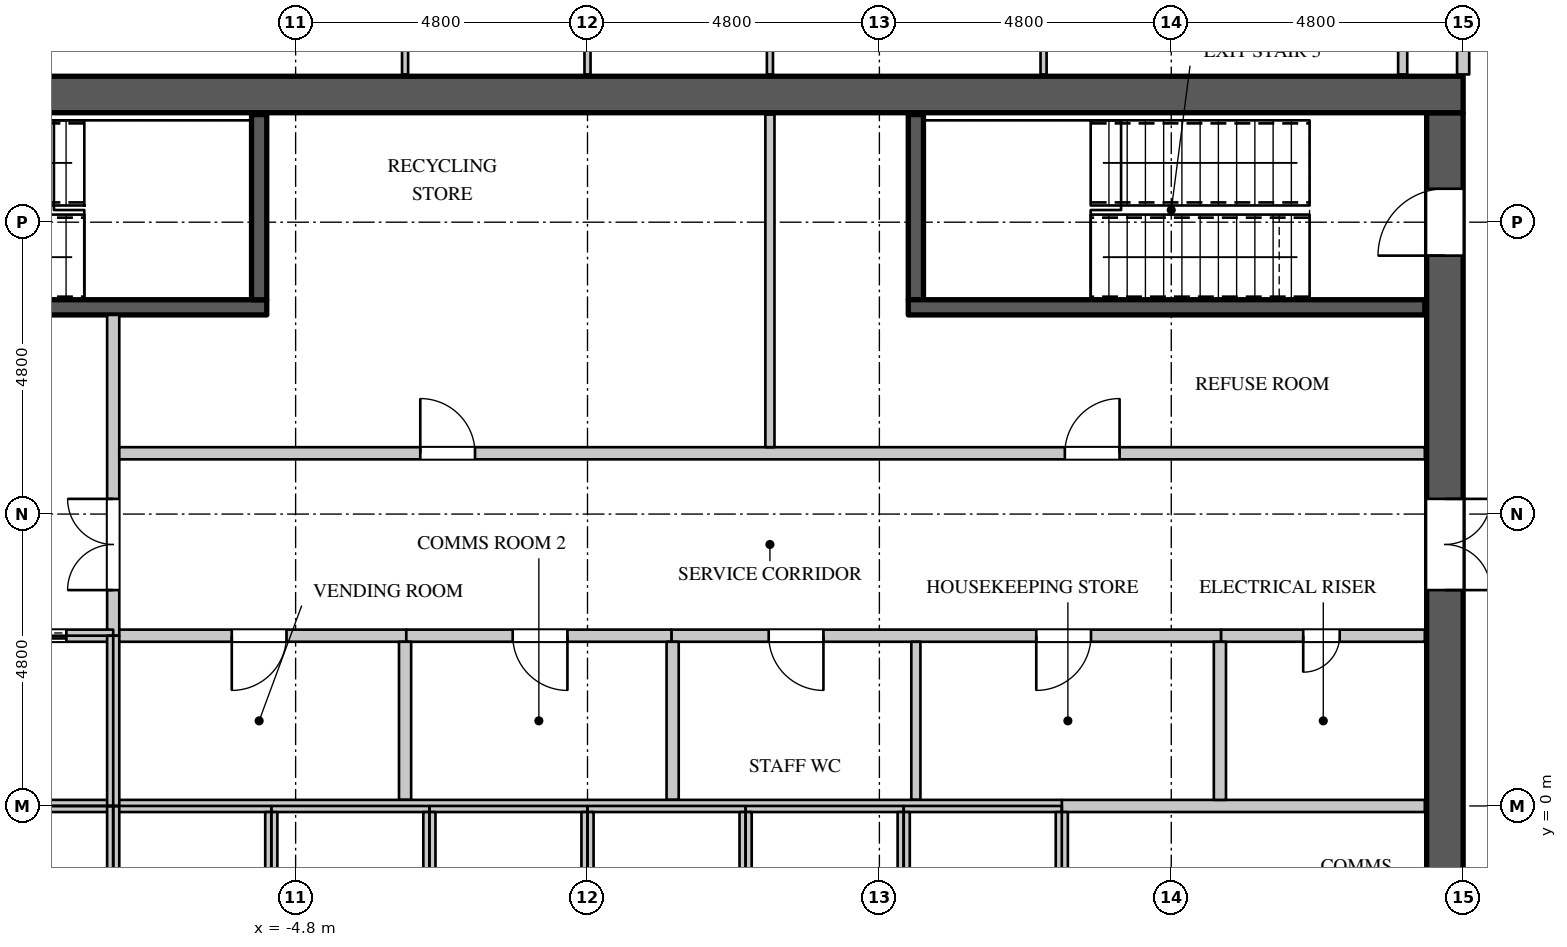
"""IFC4 building model, lengths in metres.
Left out: names, types, materials, properties, quantities, classifications, styles, units other than length and angle.
Written with IfcOpenShell. Run it as: python <this file> out.ifc"""

import sys

from ifc_helpers import new_model, si_unit, direction, frame, frame_2d, origin, place, context, subcontext, project, spatial, rectangle, extrude, element, fill, save


model = new_model("IFC4")
c1 = context("Model", 3, precision=1e-05, world=origin(), true_north=direction((0.0, 1.0)))
c2 = subcontext(c1, "Body", "Model", "MODEL_VIEW")
j1 = project(units=[si_unit("LENGTHUNIT", "METRE"), si_unit("PLANEANGLEUNIT", "RADIAN")], contexts=[c1])
p1 = place(None, origin())
s1 = spatial("IfcSite", under=j1, at=p1, CompositionType="ELEMENT")
p2 = place(p1, origin())
s2 = spatial("IfcBuilding", under=s1, at=p2, CompositionType="ELEMENT")
p3 = place(p2, frame((0.0, 0.0, 213.9)))
s3 = spatial("IfcBuildingStorey", under=s2, at=p3, CompositionType="ELEMENT", Elevation=213.9)
p4 = place(p3, frame((-14.4, 11.7, 0.0), z_axis=(0.0, 0.0, 1.0), x_axis=(1.0, 0.0, 0.0)))
e1 = element("IfcWall", 1, at=p4, inside=s3, PredefinedType="SHEAR", context=c2, shape_type="SweptSolid", body=[
    extrude(rectangle(XDim=28.8, YDim=0.6, at=frame_2d((14.4, 0.0))), origin(), (0.0, 0.0, 1.0), 4.2),
])
p5 = place(p3, frame((14.1, -11.4, 0.0), z_axis=(0.0, 0.0, 1.0), x_axis=(0.0, 1.0, 0.0)))
e2 = element("IfcWall", 2, at=p5, inside=s3, PredefinedType="SHEAR", context=c2, shape_type="SweptSolid", body=[
    extrude(rectangle(XDim=22.8, YDim=0.6, at=frame_2d((11.4, 0.0))), origin(), (0.0, 0.0, 1.0), 4.2),
])
p6 = place(p5, frame((20.45, 0.0, 0.0)))
e3 = element("IfcOpeningElement", 3, at=p6, cuts=e2, PredefinedType="OPENING", context=c2, shape_type="SweptSolid", body=[
    extrude(rectangle(XDim=1.1, YDim=2.2, at=frame_2d((0.55, 1.1))), frame((0.0, 0.31, 0.0), z_axis=(0.0, -1.0, 0.0), x_axis=(1.0, 0.0, 0.0)), (0.0, 0.0, 1.0), 0.62),
])
p7 = place(p5, frame((1.25, 0.0, 0.0)))
e4 = element("IfcOpeningElement", 4, at=p7, cuts=e2, PredefinedType="OPENING", context=c2, shape_type="SweptSolid", body=[
    extrude(rectangle(XDim=1.1, YDim=2.2, at=frame_2d((0.55, 1.1))), frame((0.0, 0.31, 0.0), z_axis=(0.0, -1.0, 0.0), x_axis=(1.0, 0.0, 0.0)), (0.0, 0.0, 1.0), 0.62),
])
p8 = place(p5, frame((14.95, 0.0, 0.0)))
e5 = element("IfcOpeningElement", 5, at=p8, cuts=e2, PredefinedType="OPENING", context=c2, shape_type="SweptSolid", body=[
    extrude(rectangle(XDim=1.5, YDim=2.4, at=frame_2d((0.75, 1.2))), frame((0.0, 0.31, 0.0), z_axis=(0.0, -1.0, 0.0), x_axis=(1.0, 0.0, 0.0)), (0.0, 0.0, 1.0), 0.62),
])
p9 = place(p5, frame((6.35, 0.0, 0.0)))
e6 = element("IfcOpeningElement", 6, at=p9, cuts=e2, PredefinedType="OPENING", context=c2, shape_type="SweptSolid", body=[
    extrude(rectangle(XDim=1.5, YDim=2.4, at=frame_2d((0.75, 1.2))), frame((0.0, 0.31, 0.0), z_axis=(0.0, -1.0, 0.0), x_axis=(1.0, 0.0, 0.0)), (0.0, 0.0, 1.0), 0.62),
])
p10 = place(p3, frame((-7.8, 2.8, 0.0), z_axis=(0.0, 0.0, 1.0), x_axis=(1.0, 0.0, 0.0)))
e7 = element("IfcWall", 7, at=p10, inside=s3, PredefinedType="PARTITIONING", context=c2, shape_type="SweptSolid", body=[
    extrude(rectangle(XDim=4.82, YDim=0.2, at=frame_2d((2.41, 0.0))), origin(), (0.0, 0.0, 1.0), 3.95),
])
p11 = place(p10, frame((1.95, 0.0, 0.0)))
e8 = element("IfcOpeningElement", 8, at=p11, cuts=e7, PredefinedType="OPENING", context=c2, shape_type="SweptSolid", body=[
    extrude(rectangle(XDim=0.9, YDim=2.2, at=frame_2d((0.45, 1.1))), frame((0.0, 0.11, 0.0), z_axis=(0.0, -1.0, 0.0), x_axis=(1.0, 0.0, 0.0)), (0.0, 0.0, 1.0), 0.22),
])
p12 = place(p3, frame((-7.8, 2.8, 0.0), z_axis=(0.0, 0.0, 1.0), x_axis=(0.0, 1.0, 0.0)))
e9 = element("IfcWall", 9, at=p12, inside=s3, PredefinedType="PARTITIONING", context=c2, shape_type="SweptSolid", body=[
    extrude(rectangle(XDim=5.275, YDim=0.2, at=frame_2d((2.637, 0.0))), origin(), (0.0, 0.0, 1.0), 3.95),
])
p13 = place(p12, frame((0.75, 0.0, 0.0)))
e10 = element("IfcOpeningElement", 10, at=p13, cuts=e9, PredefinedType="OPENING", context=c2, shape_type="SweptSolid", body=[
    extrude(rectangle(XDim=1.5, YDim=2.4, at=frame_2d((0.75, 1.2))), frame((0.0, 0.11, 0.0), z_axis=(0.0, -1.0, 0.0), x_axis=(1.0, 0.0, 0.0)), (0.0, 0.0, 1.0), 0.22),
])
p14 = place(p3, frame((-7.7, 5.8, 0.0), z_axis=(0.0, 0.0, 1.0), x_axis=(1.0, 0.0, 0.0)))
e11 = element("IfcWall", 11, at=p14, inside=s3, PredefinedType="PARTITIONING", context=c2, shape_type="SweptSolid", body=[
    extrude(rectangle(XDim=21.47, YDim=0.2, at=frame_2d((10.735, 0.0))), origin(), (0.0, 0.0, 1.0), 3.95),
])
p15 = place(p14, frame((4.95, 0.0, 0.0)))
e12 = element("IfcOpeningElement", 12, at=p15, cuts=e11, PredefinedType="OPENING", context=c2, shape_type="SweptSolid", body=[
    extrude(rectangle(XDim=0.9, YDim=2.2, at=frame_2d((0.45, 1.1))), frame((0.0, 0.11, 0.0), z_axis=(0.0, -1.0, 0.0), x_axis=(1.0, 0.0, 0.0)), (0.0, 0.0, 1.0), 0.22),
])
p16 = place(p14, frame((15.55, 0.0, 0.0)))
e13 = element("IfcOpeningElement", 13, at=p16, cuts=e11, PredefinedType="OPENING", context=c2, shape_type="SweptSolid", body=[
    extrude(rectangle(XDim=0.9, YDim=2.2, at=frame_2d((0.45, 1.1))), frame((0.0, 0.11, 0.0), z_axis=(0.0, -1.0, 0.0), x_axis=(1.0, 0.0, 0.0)), (0.0, 0.0, 1.0), 0.22),
])
p17 = place(p3, frame((1.38, 2.8, 0.0), z_axis=(0.0, 0.0, 1.0), x_axis=(1.0, 0.0, 0.0)))
e14 = element("IfcWall", 14, at=p17, inside=s3, PredefinedType="PARTITIONING", context=c2, shape_type="SweptSolid", body=[
    extrude(rectangle(XDim=9.04, YDim=0.2, at=frame_2d((4.52, 0.0))), origin(), (0.0, 0.0, 1.0), 3.95),
])
p18 = place(p17, frame((1.6, 0.0, 0.0)))
e15 = element("IfcOpeningElement", 15, at=p18, cuts=e14, PredefinedType="OPENING", context=c2, shape_type="SweptSolid", body=[
    extrude(rectangle(XDim=0.9, YDim=2.2, at=frame_2d((0.45, 1.1))), frame((0.0, 0.11, 0.0), z_axis=(0.0, -1.0, 0.0), x_axis=(1.0, 0.0, 0.0)), (0.0, 0.0, 1.0), 0.22),
])
p19 = place(p17, frame((6.0, 0.0, 0.0)))
e16 = element("IfcOpeningElement", 16, at=p19, cuts=e14, PredefinedType="OPENING", context=c2, shape_type="SweptSolid", body=[
    extrude(rectangle(XDim=0.9, YDim=2.2, at=frame_2d((0.45, 1.1))), frame((0.0, 0.11, 0.0), z_axis=(0.0, -1.0, 0.0), x_axis=(1.0, 0.0, 0.0)), (0.0, 0.0, 1.0), 0.22),
])
p20 = place(p3, frame((14.4, 12.03, 0.0), z_axis=(0.0, 0.0, 1.0), x_axis=(0.0, 1.0, 0.0)))
e17 = element("IfcWall", 17, at=p20, inside=s3, PredefinedType="PARTITIONING", context=c2, shape_type="SweptSolid", body=[
    extrude(rectangle(XDim=2.27, YDim=0.2, at=frame_2d((1.135, 0.0))), origin(), (0.0, 0.0, 1.0), 3.95),
])
p21 = place(p3, frame((3.0, 5.9, 0.0), z_axis=(0.0, 0.0, 1.0), x_axis=(0.0, 1.0, 0.0)))
e18 = element("IfcWall", 18, at=p21, inside=s3, PredefinedType="PARTITIONING", context=c2, shape_type="SweptSolid", body=[
    extrude(rectangle(XDim=5.47, YDim=0.15, at=frame_2d((2.735, 0.0))), origin(), (0.0, 0.0, 1.0), 3.95),
])
p22 = place(p3, frame((5.4, 0.1, 0.0), z_axis=(0.0, 0.0, 1.0), x_axis=(0.0, 1.0, 0.0)))
e19 = element("IfcWall", 19, at=p22, inside=s3, PredefinedType="PARTITIONING", context=c2, shape_type="SweptSolid", body=[
    extrude(rectangle(XDim=2.6, YDim=0.15, at=frame_2d((1.3, 0.0))), origin(), (0.0, 0.0, 1.0), 3.95),
])
p23 = place(p3, frame((13.406, 12.03, 0.0), z_axis=(0.0, 0.0, 1.0), x_axis=(0.0, 1.0, 0.0)))
e20 = element("IfcWall", 20, at=p23, inside=s3, PredefinedType="PARTITIONING", context=c2, shape_type="SweptSolid", body=[
    extrude(rectangle(XDim=13.701, YDim=0.15, at=frame_2d((6.851, 0.0))), origin(), (0.0, 0.0, 1.0), 3.3),
])
p24 = place(p23, frame((2.5, 0.0, 0.0)))
e21 = element("IfcOpeningElement", 21, at=p24, cuts=e20, PredefinedType="OPENING", context=c2, shape_type="SweptSolid", body=[
    extrude(rectangle(XDim=1.5, YDim=2.2, at=frame_2d((0.75, 1.1))), frame((0.0, 0.085, 0.0), z_axis=(0.0, -1.0, 0.0), x_axis=(1.0, 0.0, 0.0)), (0.0, 0.0, 1.0), 0.17),
])
p25 = place(p3, frame((-2.98, 2.8, 0.0), z_axis=(0.0, 0.0, 1.0), x_axis=(1.0, 0.0, 0.0)))
e22 = element("IfcWall", 22, at=p25, inside=s3, PredefinedType="PARTITIONING", context=c2, shape_type="SweptSolid", body=[
    extrude(rectangle(XDim=4.36, YDim=0.2, at=frame_2d((2.18, 0.0))), origin(), (0.0, 0.0, 1.0), 3.95),
])
p26 = place(p25, frame((1.75, 0.0, 0.0)))
e23 = element("IfcOpeningElement", 23, at=p26, cuts=e22, PredefinedType="OPENING", context=c2, shape_type="SweptSolid", body=[
    extrude(rectangle(XDim=0.9, YDim=2.2, at=frame_2d((0.45, 1.1))), frame((0.0, 0.11, 0.0), z_axis=(0.0, -1.0, 0.0), x_axis=(1.0, 0.0, 0.0)), (0.0, 0.0, 1.0), 0.22),
])
for number, where, z_axis, x_axis in (
    (24, (-3.0, 0.1, 0.0), (0.0, 0.0, 1.0), (0.0, 1.0, 0.0)),
    (25, (1.4, 0.1, 0.0), (0.0, 0.0, 1.0), (0.0, 1.0, 0.0)),
):
    element("IfcWall", number, at=place(p3, frame(where, z_axis=z_axis, x_axis=x_axis)), inside=s3, PredefinedType="PARTITIONING", context=c2, shape_type="SweptSolid", body=[
        extrude(rectangle(XDim=2.6, YDim=0.2, at=frame_2d((1.3, 0.0))), origin(), (0.0, 0.0, 1.0), 3.95),
    ])
p27 = place(p3, frame((7.8, 0.0, 0.0), z_axis=(0.0, 0.0, 1.0), x_axis=(1.0, 0.0, 0.0)))
e26 = element("IfcWall", 26, at=p27, inside=s3, PredefinedType="PARTITIONING", context=c2, shape_type="SweptSolid", body=[
    extrude(rectangle(XDim=5.97, YDim=0.2, at=frame_2d((2.985, 0.0))), origin(), (0.0, 0.0, 1.0), 3.95),
])
p28 = place(p3, frame((10.42, 2.8, 0.0), z_axis=(0.0, 0.0, 1.0), x_axis=(1.0, 0.0, 0.0)))
e27 = element("IfcWall", 27, at=p28, inside=s3, PredefinedType="PARTITIONING", context=c2, shape_type="SweptSolid", body=[
    extrude(rectangle(XDim=3.35, YDim=0.2, at=frame_2d((1.675, 0.0))), origin(), (0.0, 0.0, 1.0), 3.95),
])
p29 = place(p28, frame((1.35, 0.0, 0.0)))
e28 = element("IfcOpeningElement", 28, at=p29, cuts=e27, PredefinedType="OPENING", context=c2, shape_type="SweptSolid", body=[
    extrude(rectangle(XDim=0.6, YDim=2.0, at=frame_2d((0.3, 1.0))), frame((0.0, 0.11, 0.0), z_axis=(0.0, -1.0, 0.0), x_axis=(1.0, 0.0, 0.0)), (0.0, 0.0, 1.0), 0.22),
])
p30 = place(p3, frame((10.4, 0.1, 0.0), z_axis=(0.0, 0.0, 1.0), x_axis=(0.0, 1.0, 0.0)))
e29 = element("IfcWall", 29, at=p30, inside=s3, PredefinedType="PARTITIONING", context=c2, shape_type="SweptSolid", body=[
    extrude(rectangle(XDim=2.6, YDim=0.2, at=frame_2d((1.3, 0.0))), origin(), (0.0, 0.0, 1.0), 3.95),
])
p31 = place(p3, frame((-13.77, 0.0, 0.0), z_axis=(0.0, 0.0, 1.0), x_axis=(1.0, 0.0, 0.0)))
e30 = element("IfcWall", 30, at=p31, inside=s3, PredefinedType="PARTITIONING", context=c2, shape_type="SweptSolid", body=[
    extrude(rectangle(XDim=21.57, YDim=0.2, at=frame_2d((10.785, 0.0))), origin(), (0.0, 0.0, 1.0), 3.95),
])
p32 = place(p3, frame((-13.77, 2.8, 0.0), z_axis=(0.0, 0.0, 1.0), x_axis=(1.0, 0.0, 0.0)))
e31 = element("IfcWall", 31, at=p32, inside=s3, PredefinedType="PARTITIONING", context=c2, shape_type="SweptSolid", body=[
    extrude(rectangle(XDim=5.97, YDim=0.2, at=frame_2d((2.985, 0.0))), origin(), (0.0, 0.0, 1.0), 3.95),
])
p33 = place(p32, frame((1.1, 0.0, 0.0)))
e32 = element("IfcOpeningElement", 32, at=p33, cuts=e31, PredefinedType="OPENING", context=c2, shape_type="SweptSolid", body=[
    extrude(rectangle(XDim=1.1, YDim=2.2, at=frame_2d((0.55, 1.1))), frame((0.0, 0.11, 0.0), z_axis=(0.0, -1.0, 0.0), x_axis=(1.0, 0.0, 0.0)), (0.0, 0.0, 1.0), 0.22),
])
p34 = place(p32, frame((4.1, 0.0, 0.0)))
e33 = element("IfcOpeningElement", 33, at=p34, cuts=e31, PredefinedType="OPENING", context=c2, shape_type="SweptSolid", body=[
    extrude(rectangle(XDim=1.1, YDim=2.2, at=frame_2d((0.55, 1.1))), frame((0.0, 0.11, 0.0), z_axis=(0.0, -1.0, 0.0), x_axis=(1.0, 0.0, 0.0)), (0.0, 0.0, 1.0), 0.22),
])
for number, where, z_axis, x_axis in (
    (34, (-7.8, -2.8, 0.0), (0.0, 0.0, 1.0), (0.0, 1.0, 0.0)),
    (35, (-7.8, 0.0, 0.0), (0.0, 0.0, 1.0), (0.0, 1.0, 0.0)),
):
    element("IfcWall", number, at=place(p3, frame(where, z_axis=z_axis, x_axis=x_axis)), inside=s3, PredefinedType="PARTITIONING", context=c2, shape_type="SweptSolid", body=[
        extrude(rectangle(XDim=2.8, YDim=0.2, at=frame_2d((1.4, 0.0))), origin(), (0.0, 0.0, 1.0), 3.95),
    ])
for number, where, z_axis, x_axis in (
    (36, (-5.2, -2.7, 0.0), (0.0, 0.0, 1.0), (0.0, 1.0, 0.0)),
    (37, (-2.6, -2.7, 0.0), (0.0, 0.0, 1.0), (0.0, 1.0, 0.0)),
    (38, (0.0, -2.7, 0.0), (0.0, 0.0, 1.0), (0.0, 1.0, 0.0)),
    (39, (2.6, -2.7, 0.0), (0.0, 0.0, 1.0), (0.0, 1.0, 0.0)),
    (40, (5.2, -2.7, 0.0), (0.0, 0.0, 1.0), (0.0, 1.0, 0.0)),
    (41, (7.8, -2.7, 0.0), (0.0, 0.0, 1.0), (0.0, 1.0, 0.0)),
):
    element("IfcWall", number, at=place(p3, frame(where, z_axis=z_axis, x_axis=x_axis)), inside=s3, PredefinedType="PARTITIONING", context=c2, shape_type="SweptSolid", body=[
        extrude(rectangle(XDim=2.6, YDim=0.2, at=frame_2d((1.3, 0.0))), origin(), (0.0, 0.0, 1.0), 3.95),
    ])
p35 = place(p3, frame((-13.77, 8.2, 0.0), z_axis=(0.0, 0.0, 1.0), x_axis=(1.0, 0.0, 0.0)))
e42 = element("IfcWall", 42, at=p35, inside=s3, PredefinedType="SHEAR", context=c2, shape_type="SweptSolid", body=[
    extrude(rectangle(XDim=8.495, YDim=0.25, at=frame_2d((4.248, 0.0))), origin(), (0.0, 0.0, 1.0), 3.95),
])
p36 = place(p35, frame((0.15, 0.0, 0.0)))
e43 = element("IfcOpeningElement", 43, at=p36, cuts=e42, PredefinedType="OPENING", context=c2, shape_type="SweptSolid", body=[
    extrude(rectangle(XDim=1.1, YDim=2.2, at=frame_2d((0.55, 1.1))), frame((0.0, 0.135, 0.0), z_axis=(0.0, -1.0, 0.0), x_axis=(1.0, 0.0, 0.0)), (0.0, 0.0, 1.0), 0.27),
])
for number, where, z_axis, x_axis in (
    (44, (-5.4, 8.325, 0.0), (0.0, 0.0, 1.0), (0.0, 1.0, 0.0)),
    (45, (5.4, 8.325, 0.0), (0.0, 0.0, 1.0), (0.0, 1.0, 0.0)),
):
    element("IfcWall", number, at=place(p3, frame(where, z_axis=z_axis, x_axis=x_axis)), inside=s3, PredefinedType="SHEAR", context=c2, shape_type="SweptSolid", body=[
        extrude(rectangle(XDim=3.045, YDim=0.25, at=frame_2d((1.522, 0.0))), origin(), (0.0, 0.0, 1.0), 3.95),
    ])
p37 = place(p3, frame((5.275, 8.2, 0.0), z_axis=(0.0, 0.0, 1.0), x_axis=(1.0, 0.0, 0.0)))
e46 = element("IfcWall", 46, at=p37, inside=s3, PredefinedType="SHEAR", context=c2, shape_type="SweptSolid", body=[
    extrude(rectangle(XDim=8.495, YDim=0.25, at=frame_2d((4.248, 0.0))), origin(), (0.0, 0.0, 1.0), 3.95),
])
p38 = place(p3, frame((-3.0, 12.03, 0.0), z_axis=(0.0, 0.0, 1.0), x_axis=(0.0, 1.0, 0.0)))
e47 = element("IfcWall", 47, at=p38, inside=s3, PredefinedType="PARTITIONING", context=c2, shape_type="SweptSolid", body=[
    extrude(rectangle(XDim=6.42, YDim=0.1, at=frame_2d((3.21, 0.0))), origin(), (0.0, 0.0, 1.0), 3.95),
])
p39 = place(p38, frame((2.75, 0.0, 0.0)))
e48 = element("IfcOpeningElement", 48, at=p39, cuts=e47, PredefinedType="OPENING", context=c2, shape_type="SweptSolid", body=[
    extrude(rectangle(XDim=0.9, YDim=2.2, at=frame_2d((0.45, 1.1))), frame((0.0, 0.06, 0.0), z_axis=(0.0, -1.0, 0.0), x_axis=(1.0, 0.0, 0.0)), (0.0, 0.0, 1.0), 0.12),
])
p40 = place(p3, frame((0.0, 12.03, 0.0), z_axis=(0.0, 0.0, 1.0), x_axis=(0.0, 1.0, 0.0)))
e49 = element("IfcWall", 49, at=p40, inside=s3, PredefinedType="PARTITIONING", context=c2, shape_type="SweptSolid", body=[
    extrude(rectangle(XDim=6.395, YDim=0.1, at=frame_2d((3.198, 0.0))), origin(), (0.0, 0.0, 1.0), 3.95),
])
p41 = place(p40, frame((2.75, 0.0, 0.0)))
e50 = element("IfcOpeningElement", 50, at=p41, cuts=e49, PredefinedType="OPENING", context=c2, shape_type="SweptSolid", body=[
    extrude(rectangle(XDim=0.9, YDim=2.2, at=frame_2d((0.45, 1.1))), frame((0.0, 0.06, 0.0), z_axis=(0.0, -1.0, 0.0), x_axis=(1.0, 0.0, 0.0)), (0.0, 0.0, 1.0), 0.12),
])
p42 = place(p3, frame((3.0, 12.03, 0.0), z_axis=(0.0, 0.0, 1.0), x_axis=(0.0, 1.0, 0.0)))
e51 = element("IfcWall", 51, at=p42, inside=s3, PredefinedType="PARTITIONING", context=c2, shape_type="SweptSolid", body=[
    extrude(rectangle(XDim=6.42, YDim=0.1, at=frame_2d((3.21, 0.0))), origin(), (0.0, 0.0, 1.0), 3.95),
])
p43 = place(p3, frame((7.5, 12.03, 0.0), z_axis=(0.0, 0.0, 1.0), x_axis=(0.0, 1.0, 0.0)))
e52 = element("IfcWall", 52, at=p43, inside=s3, PredefinedType="PARTITIONING", context=c2, shape_type="SweptSolid", body=[
    extrude(rectangle(XDim=5.445, YDim=0.1, at=frame_2d((2.723, 0.0))), origin(), (0.0, 0.0, 1.0), 3.95),
])
p44 = place(p43, frame((2.25, 0.0, 0.0)))
e53 = element("IfcOpeningElement", 53, at=p44, cuts=e52, PredefinedType="OPENING", context=c2, shape_type="SweptSolid", body=[
    extrude(rectangle(XDim=0.9, YDim=2.2, at=frame_2d((0.45, 1.1))), frame((0.0, 0.06, 0.0), z_axis=(0.0, -1.0, 0.0), x_axis=(1.0, 0.0, 0.0)), (0.0, 0.0, 1.0), 0.12),
])
p45 = place(p29, origin())
e54 = element("IfcDoor", 54, at=p45, inside=s3, OperationType="SINGLE_SWING_RIGHT", PredefinedType="DOOR", context=c2, shape_type="SweptSolid", body=[
    extrude(rectangle(XDim=0.6, YDim=2.0, at=frame_2d((0.3, 1.0))), frame((0.0, 0.025, 0.0), z_axis=(0.0, -1.0, 0.0), x_axis=(1.0, 0.0, 0.0)), (0.0, 0.0, 1.0), 0.05),
])
fill(e28, e54)
p46 = place(p15, origin())
e55 = element("IfcDoor", 55, at=p46, inside=s3, OperationType="SINGLE_SWING_LEFT", PredefinedType="DOOR", context=c2, shape_type="SweptSolid", body=[
    extrude(rectangle(XDim=0.9, YDim=2.2, at=frame_2d((0.45, 1.1))), frame((0.0, 0.025, 0.0), z_axis=(0.0, -1.0, 0.0), x_axis=(1.0, 0.0, 0.0)), (0.0, 0.0, 1.0), 0.05),
])
fill(e12, e55)
p47 = place(p16, origin())
e56 = element("IfcDoor", 56, at=p47, inside=s3, OperationType="SINGLE_SWING_RIGHT", PredefinedType="DOOR", context=c2, shape_type="SweptSolid", body=[
    extrude(rectangle(XDim=0.9, YDim=2.2, at=frame_2d((0.45, 1.1))), frame((0.0, 0.025, 0.0), z_axis=(0.0, -1.0, 0.0), x_axis=(1.0, 0.0, 0.0)), (0.0, 0.0, 1.0), 0.05),
])
fill(e13, e56)
p48 = place(p11, origin())
e57 = element("IfcDoor", 57, at=p48, inside=s3, OperationType="SINGLE_SWING_RIGHT", PredefinedType="DOOR", context=c2, shape_type="SweptSolid", body=[
    extrude(rectangle(XDim=0.9, YDim=2.2, at=frame_2d((0.45, 1.1))), frame((0.0, 0.025, 0.0), z_axis=(0.0, -1.0, 0.0), x_axis=(1.0, 0.0, 0.0)), (0.0, 0.0, 1.0), 0.05),
])
fill(e8, e57)
p49 = place(p26, origin())
e58 = element("IfcDoor", 58, at=p49, inside=s3, OperationType="SINGLE_SWING_LEFT", PredefinedType="DOOR", context=c2, shape_type="SweptSolid", body=[
    extrude(rectangle(XDim=0.9, YDim=2.2, at=frame_2d((0.45, 1.1))), frame((0.0, 0.025, 0.0), z_axis=(0.0, -1.0, 0.0), x_axis=(1.0, 0.0, 0.0)), (0.0, 0.0, 1.0), 0.05),
])
fill(e23, e58)
p50 = place(p18, origin())
e59 = element("IfcDoor", 59, at=p50, inside=s3, OperationType="SINGLE_SWING_LEFT", PredefinedType="DOOR", context=c2, shape_type="SweptSolid", body=[
    extrude(rectangle(XDim=0.9, YDim=2.2, at=frame_2d((0.45, 1.1))), frame((0.0, 0.025, 0.0), z_axis=(0.0, -1.0, 0.0), x_axis=(1.0, 0.0, 0.0)), (0.0, 0.0, 1.0), 0.05),
])
fill(e15, e59)
p51 = place(p19, origin())
e60 = element("IfcDoor", 60, at=p51, inside=s3, OperationType="SINGLE_SWING_RIGHT", PredefinedType="DOOR", context=c2, shape_type="SweptSolid", body=[
    extrude(rectangle(XDim=0.9, YDim=2.2, at=frame_2d((0.45, 1.1))), frame((0.0, 0.025, 0.0), z_axis=(0.0, -1.0, 0.0), x_axis=(1.0, 0.0, 0.0)), (0.0, 0.0, 1.0), 0.05),
])
fill(e16, e60)
p52 = place(p34, origin())
e61 = element("IfcDoor", 61, at=p52, inside=s3, OperationType="DOUBLE_DOOR_SLIDING", PredefinedType="DOOR", context=c2, shape_type="SweptSolid", body=[
    extrude(rectangle(XDim=1.1, YDim=2.2, at=frame_2d((0.55, 1.1))), frame((0.0, 0.025, 0.0), z_axis=(0.0, -1.0, 0.0), x_axis=(1.0, 0.0, 0.0)), (0.0, 0.0, 1.0), 0.05),
])
fill(e33, e61)
p53 = place(p13, origin())
e62 = element("IfcDoor", 62, at=p53, inside=s3, OperationType="DOUBLE_DOOR_SINGLE_SWING", PredefinedType="DOOR", context=c2, shape_type="SweptSolid", body=[
    extrude(rectangle(XDim=1.5, YDim=2.4, at=frame_2d((0.75, 1.2))), frame((0.0, 0.025, 0.0), z_axis=(0.0, -1.0, 0.0), x_axis=(1.0, 0.0, 0.0)), (0.0, 0.0, 1.0), 0.05),
])
fill(e10, e62)
p54 = place(p6, origin())
e63 = element("IfcDoor", 63, at=p54, inside=s3, OperationType="SINGLE_SWING_LEFT", PredefinedType="DOOR", context=c2, shape_type="SweptSolid", body=[
    extrude(rectangle(XDim=1.1, YDim=2.2, at=frame_2d((0.55, 1.1))), frame((0.0, 0.295, 0.0), z_axis=(0.0, -1.0, 0.0), x_axis=(1.0, 0.0, 0.0)), (0.0, 0.0, 1.0), 0.05),
])
fill(e3, e63)
p55 = place(p8, origin())
e64 = element("IfcDoor", 64, at=p55, inside=s3, OperationType="DOUBLE_DOOR_SINGLE_SWING", PredefinedType="DOOR", context=c2, shape_type="SweptSolid", body=[
    extrude(rectangle(XDim=1.5, YDim=2.4, at=frame_2d((0.75, 1.2))), frame((0.0, -0.245, 0.0), z_axis=(0.0, -1.0, 0.0), x_axis=(1.0, 0.0, 0.0)), (0.0, 0.0, 1.0), 0.05),
])
fill(e5, e64)
save(model, sys.argv[1])
